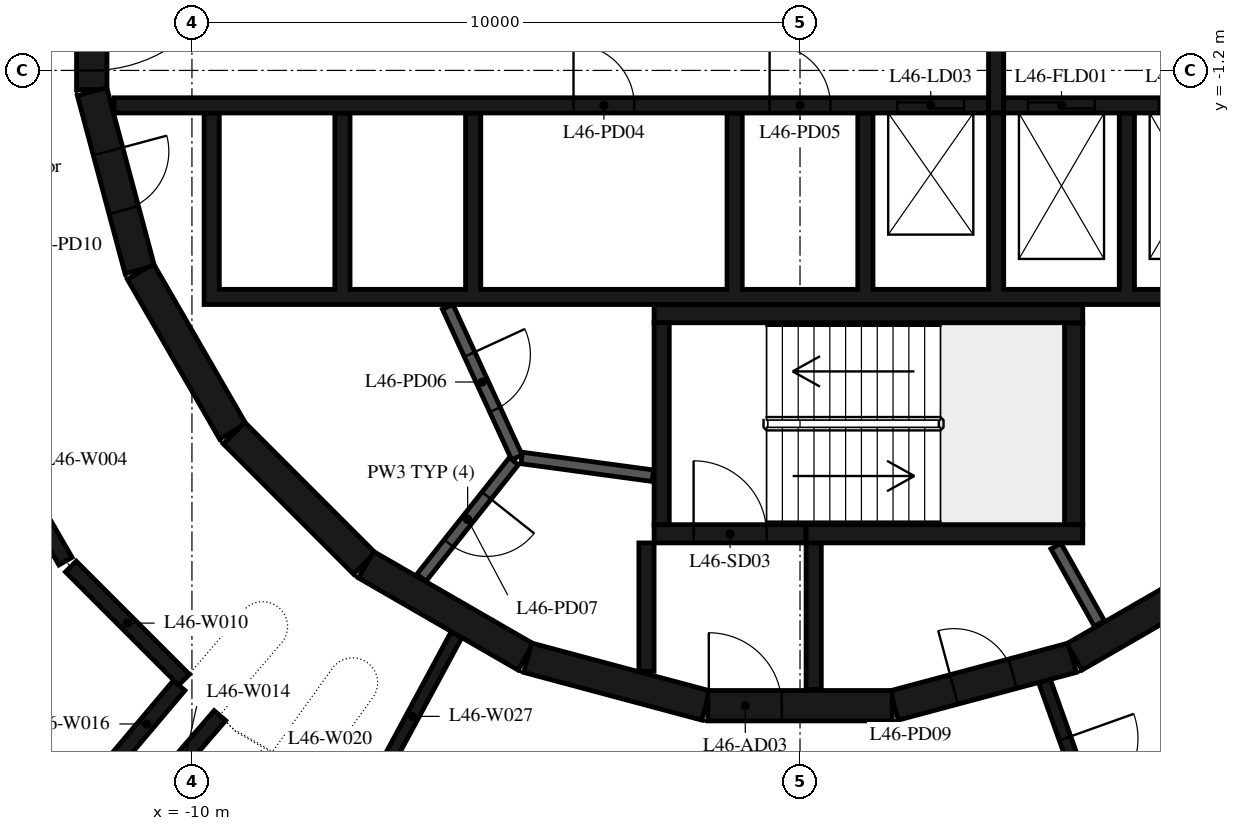
"""IFC4 building model, lengths in metres.
Left out: names, types, materials, properties, quantities, classifications, styles, units other than length and angle.
Written with IfcOpenShell. Run it as: python <this file> out.ifc"""

import sys

from ifc_helpers import new_model, si_unit, direction, frame, frame_2d, origin, place, context, subcontext, project, spatial, polyline, rectangle, outline, extrude, element, fill, save


model = new_model("IFC4")
c1 = context("Model", 3, precision=1e-05, world=origin(), true_north=direction((0.0, 1.0)))
c2 = subcontext(c1, "Body", "Model", "MODEL_VIEW")
j1 = project(units=[si_unit("LENGTHUNIT", "METRE"), si_unit("PLANEANGLEUNIT", "RADIAN")], contexts=[c1])
p1 = place(None, origin())
s1 = spatial("IfcSite", under=j1, at=p1, CompositionType="ELEMENT")
p2 = place(p1, origin())
s2 = spatial("IfcBuilding", under=s1, at=p2, CompositionType="ELEMENT")
p3 = place(p2, frame((0.0, 0.0, 183.2)))
s3 = spatial("IfcBuildingStorey", under=s2, at=p3, CompositionType="ELEMENT", Elevation=183.2)
p4 = place(p3, frame((1.55, -11.643, 0.0), z_axis=(0.0, 0.0, 1.0), x_axis=(0.965948410781, 0.258734743916, 0.0)))
e1 = element("IfcWall", 1, at=p4, inside=s3, PredefinedType="SHEAR", context=c2, shape_type="SweptSolid", body=[
    extrude(rectangle(XDim=3.033, YDim=0.5, at=frame_2d((1.516, 0.0))), origin(), (0.0, 0.0, 1.0), 4.75),
])
p5 = place(p4, frame((1.016, 0.0, 0.0)))
e2 = element("IfcOpeningElement", 2, at=p5, cuts=e1, PredefinedType="OPENING", context=c2, shape_type="SweptSolid", body=[
    extrude(rectangle(XDim=1.0, YDim=2.4, at=frame_2d((0.5, 1.2))), frame((0.0, 0.26, 0.0), z_axis=(0.0, -1.0, 0.0), x_axis=(1.0, 0.0, 0.0)), (0.0, 0.0, 1.0), 0.52),
])
p6 = place(p3, frame((4.51, -10.845, 0.0), z_axis=(0.0, 0.0, 1.0), x_axis=(0.865975092491, 0.500087131594, 0.0)))
e3 = element("IfcWall", 3, at=p6, inside=s3, PredefinedType="SHEAR", context=c2, shape_type="SweptSolid", body=[
    extrude(rectangle(XDim=3.033, YDim=0.5, at=frame_2d((1.516, 0.0))), origin(), (0.0, 0.0, 1.0), 4.75),
])
p7 = place(p3, frame((-11.647, 1.516, 0.0), z_axis=(0.0, 0.0, 1.0), x_axis=(0.0, -1.0, 0.0)))
e4 = element("IfcWall", 4, at=p7, inside=s3, PredefinedType="SHEAR", context=c2, shape_type="SweptSolid", body=[
    extrude(rectangle(XDim=3.033, YDim=0.5, at=frame_2d((1.516, 0.0))), origin(), (0.0, 0.0, 1.0), 4.75),
])
p8 = place(p7, frame((0.316, 0.0, 0.0)))
e5 = element("IfcOpeningElement", 5, at=p8, cuts=e4, PredefinedType="OPENING", context=c2, shape_type="SweptSolid", body=[
    extrude(rectangle(XDim=2.4, YDim=2.1, at=frame_2d((1.2, 1.05))), frame((0.0, 0.26, 0.0), z_axis=(0.0, -1.0, 0.0), x_axis=(1.0, 0.0, 0.0)), (0.0, 0.0, 1.0), 0.52),
])
p9 = place(p3, frame((-11.643, -1.55, 0.0), z_axis=(0.0, 0.0, 1.0), x_axis=(0.258734743916, -0.965948410781, 0.0)))
e6 = element("IfcWall", 6, at=p9, inside=s3, PredefinedType="SHEAR", context=c2, shape_type="SweptSolid", body=[
    extrude(rectangle(XDim=3.033, YDim=0.5, at=frame_2d((1.516, 0.0))), origin(), (0.0, 0.0, 1.0), 4.75),
])
p10 = place(p9, frame((1.016, 0.0, 0.0)))
e7 = element("IfcOpeningElement", 7, at=p10, cuts=e6, PredefinedType="OPENING", context=c2, shape_type="SweptSolid", body=[
    extrude(rectangle(XDim=1.0, YDim=2.4, at=frame_2d((0.5, 1.2))), frame((0.0, 0.26, 0.0), z_axis=(0.0, -1.0, 0.0), x_axis=(1.0, 0.0, 0.0)), (0.0, 0.0, 1.0), 0.52),
])
p11 = place(p3, frame((-10.845, -4.51, 0.0), z_axis=(0.0, 0.0, 1.0), x_axis=(0.500087131594, -0.865975092491, 0.0)))
e8 = element("IfcWall", 8, at=p11, inside=s3, PredefinedType="SHEAR", context=c2, shape_type="SweptSolid", body=[
    extrude(rectangle(XDim=3.033, YDim=0.5, at=frame_2d((1.516, 0.0))), origin(), (0.0, 0.0, 1.0), 4.75),
])
p12 = place(p3, frame((-9.308, -7.164, 0.0), z_axis=(0.0, 0.0, 1.0), x_axis=(0.707106781187, -0.707106781187, 0.0)))
e9 = element("IfcWall", 9, at=p12, inside=s3, PredefinedType="SHEAR", context=c2, shape_type="SweptSolid", body=[
    extrude(rectangle(XDim=3.032, YDim=0.5, at=frame_2d((1.516, 0.0))), origin(), (0.0, 0.0, 1.0), 4.75),
])
for number, where, z_axis, x_axis in (
    (10, (-7.137, -9.329, 0.0), (0.0, 0.0, 1.0), (0.866, -0.5, 0.0)),
    (11, (-4.479, -10.858, 0.0), (0.0, 0.0, 1.0), (0.966, -0.259, 0.0)),
):
    element("IfcWall", number, at=place(p3, frame(where, z_axis=z_axis, x_axis=x_axis)), inside=s3, PredefinedType="SHEAR", context=c2, shape_type="SweptSolid", body=[
        extrude(rectangle(XDim=3.033, YDim=0.5, at=frame_2d((1.516, 0.0))), origin(), (0.0, 0.0, 1.0), 4.75),
    ])
p13 = place(p3, frame((-1.516, -11.647, 0.0), z_axis=(0.0, 0.0, 1.0), x_axis=(1.0, 0.0, 0.0)))
e12 = element("IfcWall", 12, at=p13, inside=s3, PredefinedType="SHEAR", context=c2, shape_type="SweptSolid", body=[
    extrude(rectangle(XDim=3.033, YDim=0.5, at=frame_2d((1.516, 0.0))), origin(), (0.0, 0.0, 1.0), 4.75),
])
p14 = place(p13, frame((0.016, 0.0, 0.0)))
e13 = element("IfcOpeningElement", 13, at=p14, cuts=e12, PredefinedType="OPENING", context=c2, shape_type="SweptSolid", body=[
    extrude(rectangle(XDim=1.2, YDim=2.1, at=frame_2d((0.6, 1.05))), frame((0.0, 0.26, 0.0), z_axis=(0.0, -1.0, 0.0), x_axis=(1.0, 0.0, 0.0)), (0.0, 0.0, 1.0), 0.52),
])
p15 = place(p3, frame((-2.275, -8.67, 0.0), z_axis=(0.0, 0.0, 1.0), x_axis=(0.0, 1.0, 0.0)))
e14 = element("IfcWall", 14, at=p15, inside=s3, PredefinedType="SHEAR", context=c2, shape_type="SweptSolid", body=[
    extrude(rectangle(XDim=3.32, YDim=0.25, at=frame_2d((1.66, 0.0))), origin(), (0.0, 0.0, 1.0), 4.75),
])
p16 = place(p3, frame((-2.4, -5.2, 0.0), z_axis=(0.0, 0.0, 1.0), x_axis=(1.0, 0.0, 0.0)))
e15 = element("IfcWall", 15, at=p16, inside=s3, PredefinedType="SHEAR", context=c2, shape_type="SweptSolid", body=[
    extrude(rectangle(XDim=7.05, YDim=0.3, at=frame_2d((3.525, 0.0))), origin(), (0.0, 0.0, 1.0), 4.75),
])
p17 = place(p3, frame((4.5, -8.67, 0.0), z_axis=(0.0, 0.0, 1.0), x_axis=(0.0, 1.0, 0.0)))
e16 = element("IfcWall", 16, at=p17, inside=s3, PredefinedType="SHEAR", context=c2, shape_type="SweptSolid", body=[
    extrude(rectangle(XDim=3.32, YDim=0.3, at=frame_2d((1.66, 0.0))), origin(), (0.0, 0.0, 1.0), 4.75),
])
p18 = place(p3, frame((0.1, -8.82, 0.0), z_axis=(0.0, 0.0, 1.0), x_axis=(1.0, 0.0, 0.0)))
e17 = element("IfcWall", 17, at=p18, inside=s3, PredefinedType="SHEAR", context=c2, shape_type="SweptSolid", body=[
    extrude(rectangle(XDim=4.55, YDim=0.3, at=frame_2d((2.275, 0.0))), origin(), (0.0, 0.0, 1.0), 4.75),
])
p19 = place(p3, frame((-2.4, -8.82, 0.0), z_axis=(0.0, 0.0, 1.0), x_axis=(1.0, 0.0, 0.0)))
e18 = element("IfcWall", 18, at=p19, inside=s3, PredefinedType="SHEAR", context=c2, shape_type="SweptSolid", body=[
    extrude(rectangle(XDim=2.5, YDim=0.3, at=frame_2d((1.25, 0.0))), origin(), (0.0, 0.0, 1.0), 4.75),
])
p20 = place(p19, frame((0.65, 0.0, 0.0)))
e19 = element("IfcOpeningElement", 19, at=p20, cuts=e18, PredefinedType="OPENING", context=c2, shape_type="SweptSolid", body=[
    extrude(rectangle(XDim=1.2, YDim=2.1, at=frame_2d((0.6, 1.05))), frame((0.0, 0.16, 0.0), z_axis=(0.0, -1.0, 0.0), x_axis=(1.0, 0.0, 0.0)), (0.0, 0.0, 1.0), 0.32),
])
p21 = place(p3, frame((-2.525, -8.97, 0.0), z_axis=(0.0, 0.0, 1.0), x_axis=(0.0, -1.0, 0.0)))
e20 = element("IfcWall", 20, at=p21, inside=s3, PredefinedType="SHEAR", context=c2, shape_type="SweptSolid", body=[
    extrude(rectangle(XDim=2.11, YDim=0.25, at=frame_2d((1.055, 0.0))), origin(), (0.0, 0.0, 1.0), 4.75),
])
p22 = place(p3, frame((0.225, -8.97, 0.0), z_axis=(0.0, 0.0, 1.0), x_axis=(0.0, -1.0, 0.0)))
e21 = element("IfcWall", 21, at=p22, inside=s3, PredefinedType="SHEAR", context=c2, shape_type="SweptSolid", body=[
    extrude(rectangle(XDim=2.41, YDim=0.25, at=frame_2d((1.205, 0.0))), origin(), (0.0, 0.0, 1.0), 4.75),
])
p23 = place(p3, origin())
e22 = element("IfcWall", 22, at=p23, inside=s3, PredefinedType="SHEAR", context=c2, shape_type="SweptSolid", body=[
    extrude(outline(polyline([(9.8, -5.05), (9.8, -4.8), (9.8, -1.9), (9.55, -1.9), (9.55, -4.8), (7.65, -4.8), (7.65, -1.9), (7.4, -1.9), (7.4, -4.8), (5.5, -4.8), (5.5, -1.9), (5.25, -1.9), (5.25, -4.8), (3.35, -4.8), (3.35, -1.9), (3.1, -1.9), (3.1, -4.8), (1.2, -4.8), (1.2, -1.9), (0.95, -1.9), (0.95, -4.8), (-0.95, -4.8), (-0.95, -1.9), (-1.2, -1.9), (-1.2, -4.8), (-5.25, -4.8), (-5.25, -1.9), (-5.5, -1.9), (-5.5, -4.8), (-7.4, -4.8), (-7.4, -1.9), (-7.65, -1.9), (-7.65, -4.8), (-9.55, -4.8), (-9.55, -1.9), (-9.8, -1.9), (-9.8, -4.8), (-9.8, -5.05), (9.8, -5.05)])), origin(), (0.0, 0.0, 1.0), 4.75),
])
p24 = place(p3, frame((-11.28, -1.775, 0.0), z_axis=(0.0, 0.0, 1.0), x_axis=(1.0, 0.0, 0.0)))
e23 = element("IfcWall", 23, at=p24, inside=s3, PredefinedType="SHEAR", context=c2, shape_type="SweptSolid", body=[
    extrude(rectangle(XDim=14.38, YDim=0.25, at=frame_2d((7.19, 0.0))), origin(), (0.0, 0.0, 1.0), 4.75),
])
p25 = place(p24, frame((12.88, 0.0, 0.0)))
e24 = element("IfcOpeningElement", 24, at=p25, cuts=e23, PredefinedType="OPENING", context=c2, shape_type="SweptSolid", body=[
    extrude(rectangle(XDim=1.1, YDim=2.1, at=frame_2d((0.55, 1.05))), frame((0.0, 0.135, 0.0), z_axis=(0.0, -1.0, 0.0), x_axis=(1.0, 0.0, 0.0)), (0.0, 0.0, 1.0), 0.27),
])
p26 = place(p24, frame((7.555, 0.0, 0.0)))
e25 = element("IfcOpeningElement", 25, at=p26, cuts=e23, PredefinedType="OPENING", context=c2, shape_type="SweptSolid", body=[
    extrude(rectangle(XDim=1.0, YDim=2.4, at=frame_2d((0.5, 1.2))), frame((0.0, 0.135, 0.0), z_axis=(0.0, -1.0, 0.0), x_axis=(1.0, 0.0, 0.0)), (0.0, 0.0, 1.0), 0.27),
])
p27 = place(p24, frame((10.78, 0.0, 0.0)))
e26 = element("IfcOpeningElement", 26, at=p27, cuts=e23, PredefinedType="OPENING", context=c2, shape_type="SweptSolid", body=[
    extrude(rectangle(XDim=1.0, YDim=2.4, at=frame_2d((0.5, 1.2))), frame((0.0, 0.135, 0.0), z_axis=(0.0, -1.0, 0.0), x_axis=(1.0, 0.0, 0.0)), (0.0, 0.0, 1.0), 0.27),
])
p28 = place(p3, frame((3.35, -1.775, 0.0), z_axis=(0.0, 0.0, 1.0), x_axis=(1.0, 0.0, 0.0)))
e27 = element("IfcWall", 27, at=p28, inside=s3, PredefinedType="SHEAR", context=c2, shape_type="SweptSolid", body=[
    extrude(rectangle(XDim=7.93, YDim=0.25, at=frame_2d((3.965, 0.0))), origin(), (0.0, 0.0, 1.0), 4.75),
])
p29 = place(p28, frame((0.4, 0.0, 0.0)))
e28 = element("IfcOpeningElement", 28, at=p29, cuts=e27, PredefinedType="OPENING", context=c2, shape_type="SweptSolid", body=[
    extrude(rectangle(XDim=1.1, YDim=2.4, at=frame_2d((0.55, 1.2))), frame((0.0, 0.135, 0.0), z_axis=(0.0, -1.0, 0.0), x_axis=(1.0, 0.0, 0.0)), (0.0, 0.0, 1.0), 0.27),
])
p30 = place(p28, frame((2.55, 0.0, 0.0)))
e29 = element("IfcOpeningElement", 29, at=p30, cuts=e27, PredefinedType="OPENING", context=c2, shape_type="SweptSolid", body=[
    extrude(rectangle(XDim=1.1, YDim=2.4, at=frame_2d((0.55, 1.2))), frame((0.0, 0.135, 0.0), z_axis=(0.0, -1.0, 0.0), x_axis=(1.0, 0.0, 0.0)), (0.0, 0.0, 1.0), 0.27),
])
p31 = place(p28, frame((4.7, 0.0, 0.0)))
e30 = element("IfcOpeningElement", 30, at=p31, cuts=e27, PredefinedType="OPENING", context=c2, shape_type="SweptSolid", body=[
    extrude(rectangle(XDim=1.1, YDim=2.4, at=frame_2d((0.55, 1.2))), frame((0.0, 0.135, 0.0), z_axis=(0.0, -1.0, 0.0), x_axis=(1.0, 0.0, 0.0)), (0.0, 0.0, 1.0), 0.27),
])
p32 = place(p3, frame((3.225, -1.9, 0.0), z_axis=(0.0, 0.0, 1.0), x_axis=(0.0, 1.0, 0.0)))
e31 = element("IfcWall", 31, at=p32, inside=s3, PredefinedType="SHEAR", context=c2, shape_type="SweptSolid", body=[
    extrude(rectangle(XDim=3.8, YDim=0.25, at=frame_2d((1.9, 0.0))), origin(), (0.0, 0.0, 1.0), 4.75),
])
p33 = place(p3, frame((4.922, -10.296, 0.0), z_axis=(0.0, 0.0, 1.0), x_axis=(-0.48860846254, 0.872503163509, 0.0)))
e32 = element("IfcWall", 32, at=p33, inside=s3, PredefinedType="PARTITIONING", context=c2, shape_type="SweptSolid", body=[
    extrude(rectangle(XDim=1.459, YDim=0.19, at=frame_2d((0.73, 0.0))), origin(), (0.0, 0.0, 1.0), 4.75),
])
p34 = place(p3, frame((-5.795, -5.086, 0.0), z_axis=(0.0, 0.0, 1.0), x_axis=(0.417887867606, -0.908498613157, 0.0)))
e33 = element("IfcWall", 33, at=p34, inside=s3, PredefinedType="PARTITIONING", context=c2, shape_type="SweptSolid", body=[
    extrude(rectangle(XDim=2.726, YDim=0.19, at=frame_2d((1.363, 0.0))), origin(), (0.0, 0.0, 1.0), 4.75),
])
p35 = place(p34, frame((0.863, 0.0, 0.0)))
e34 = element("IfcOpeningElement", 34, at=p35, cuts=e33, PredefinedType="OPENING", context=c2, shape_type="SweptSolid", body=[
    extrude(rectangle(XDim=1.0, YDim=2.4, at=frame_2d((0.5, 1.2))), frame((0.0, 0.105, 0.0), z_axis=(0.0, -1.0, 0.0), x_axis=(1.0, 0.0, 0.0)), (0.0, 0.0, 1.0), 0.21),
])
p36 = place(p3, frame((-4.706, -7.625, 0.0), z_axis=(0.0, 0.0, 1.0), x_axis=(-0.621392599334, -0.783499353856, 0.0)))
e35 = element("IfcWall", 35, at=p36, inside=s3, PredefinedType="PARTITIONING", context=c2, shape_type="SweptSolid", body=[
    extrude(rectangle(XDim=2.447, YDim=0.19, at=frame_2d((1.224, 0.0))), origin(), (0.0, 0.0, 1.0), 4.75),
])
p37 = place(p36, frame((0.724, 0.0, 0.0)))
e36 = element("IfcOpeningElement", 36, at=p37, cuts=e35, PredefinedType="OPENING", context=c2, shape_type="SweptSolid", body=[
    extrude(rectangle(XDim=1.0, YDim=2.4, at=frame_2d((0.5, 1.2))), frame((0.0, 0.105, 0.0), z_axis=(0.0, -1.0, 0.0), x_axis=(1.0, 0.0, 0.0)), (0.0, 0.0, 1.0), 0.21),
])
p38 = place(p3, frame((-2.42, -7.865, 0.0), z_axis=(0.0, 0.0, 1.0), x_axis=(-0.990972299108, 0.134066783362, 0.0)))
e37 = element("IfcWall", 37, at=p38, inside=s3, PredefinedType="PARTITIONING", context=c2, shape_type="SweptSolid", body=[
    extrude(rectangle(XDim=2.176, YDim=0.19, at=frame_2d((1.088, 0.0))), origin(), (0.0, 0.0, 1.0), 4.75),
])
p39 = place(p3, frame((-14.007, -5.938, 0.0), z_axis=(0.0, 0.0, 1.0), x_axis=(0.500708693508, -0.865615852585, 0.0)))
e38 = element("IfcWall", 38, at=p39, inside=s3, PredefinedType="PARTITIONING", context=c2, shape_type="SweptSolid", body=[
    extrude(rectangle(XDim=3.849, YDim=0.25, at=frame_2d((1.925, 0.0))), origin(), (0.0, 0.0, 1.0), 4.75),
])
p40 = place(p3, frame((-11.992, -9.358, 0.0), z_axis=(0.0, 0.0, 1.0), x_axis=(0.707153144284, -0.707060415049, 0.0)))
e39 = element("IfcWall", 39, at=p40, inside=s3, PredefinedType="PARTITIONING", context=c2, shape_type="SweptSolid", body=[
    extrude(rectangle(XDim=2.633, YDim=0.25, at=frame_2d((1.316, 0.0))), origin(), (0.0, 0.0, 1.0), 4.75),
])
p41 = place(p3, frame((-10.66, -13.11, 0.0), z_axis=(0.0, 0.0, 1.0), x_axis=(0.652652485568, 0.757657398223, 0.0)))
e40 = element("IfcWall", 40, at=p41, inside=s3, PredefinedType="PARTITIONING", context=c2, shape_type="SweptSolid", body=[
    extrude(rectangle(XDim=1.716, YDim=0.25, at=frame_2d((0.858, 0.0))), origin(), (0.0, 0.0, 1.0), 4.75),
])
p42 = place(p3, frame((-10.211, -11.315, 0.0), z_axis=(0.0, 0.0, 1.0), x_axis=(-0.645677872328, -0.763609903803, 0.0)))
e41 = element("IfcWall", 41, at=p42, inside=s3, PredefinedType="PARTITIONING", context=c2, shape_type="SweptSolid", body=[
    extrude(rectangle(XDim=1.656, YDim=0.25, at=frame_2d((0.828, 0.0))), origin(), (0.0, 0.0, 1.0), 4.75),
])
p43 = place(p3, frame((-7.097, -13.165, 0.0), z_axis=(0.0, 0.0, 1.0), x_axis=(0.474500660471, 0.880255146655, 0.0)))
e42 = element("IfcWall", 42, at=p43, inside=s3, PredefinedType="PARTITIONING", context=c2, shape_type="SweptSolid", body=[
    extrude(rectangle(XDim=3.051, YDim=0.2, at=frame_2d((1.525, 0.0))), origin(), (0.0, 0.0, 1.0), 4.75),
])
p44 = place(p3, frame((4.02, -11.24, 0.0), z_axis=(0.0, 0.0, 1.0), x_axis=(0.336751058688, -0.941593715183, 0.0)))
e43 = element("IfcWall", 43, at=p44, inside=s3, PredefinedType="PARTITIONING", context=c2, shape_type="SweptSolid", body=[
    extrude(rectangle(XDim=3.207, YDim=0.2, at=frame_2d((1.604, 0.0))), origin(), (0.0, 0.0, 1.0), 4.75),
])
p45 = place(p44, frame((1.004, 0.0, 0.0)))
e44 = element("IfcOpeningElement", 44, at=p45, cuts=e43, PredefinedType="OPENING", context=c2, shape_type="SweptSolid", body=[
    extrude(rectangle(XDim=1.2, YDim=2.1, at=frame_2d((0.6, 1.05))), frame((0.0, 0.11, 0.0), z_axis=(0.0, -1.0, 0.0), x_axis=(1.0, 0.0, 0.0)), (0.0, 0.0, 1.0), 0.22),
])
p46 = place(p3, frame((5.938, -14.007, 0.0), z_axis=(0.0, 0.0, 1.0), x_axis=(0.865615852585, 0.500708693508, 0.0)))
e45 = element("IfcWall", 45, at=p46, inside=s3, PredefinedType="PARTITIONING", context=c2, shape_type="SweptSolid", body=[
    extrude(rectangle(XDim=3.849, YDim=0.25, at=frame_2d((1.925, 0.0))), origin(), (0.0, 0.0, 1.0), 4.75),
])
p47 = place(p46, frame((1.425, 0.0, 0.0)))
e46 = element("IfcOpeningElement", 46, at=p47, cuts=e45, PredefinedType="OPENING", context=c2, shape_type="SweptSolid", body=[
    extrude(rectangle(XDim=1.0, YDim=2.1, at=frame_2d((0.5, 1.05))), frame((0.0, 0.135, 0.0), z_axis=(0.0, -1.0, 0.0), x_axis=(1.0, 0.0, 0.0)), (0.0, 0.0, 1.0), 0.27),
])
p48 = place(p20, origin())
e47 = element("IfcDoor", 47, at=p48, inside=s3, OperationType="SINGLE_SWING_LEFT", PredefinedType="DOOR", context=c2, shape_type="SweptSolid", body=[
    extrude(rectangle(XDim=1.2, YDim=2.1, at=frame_2d((0.6, 1.05))), frame((0.0, 0.025, 0.0), z_axis=(0.0, -1.0, 0.0), x_axis=(1.0, 0.0, 0.0)), (0.0, 0.0, 1.0), 0.05),
])
fill(e19, e47)
p49 = place(p14, origin())
e48 = element("IfcDoor", 48, at=p49, inside=s3, OperationType="SINGLE_SWING_RIGHT", PredefinedType="DOOR", context=c2, shape_type="SweptSolid", body=[
    extrude(rectangle(XDim=1.2, YDim=2.1, at=frame_2d((0.6, 1.05))), frame((0.0, 0.025, 0.0), z_axis=(0.0, -1.0, 0.0), x_axis=(1.0, 0.0, 0.0)), (0.0, 0.0, 1.0), 0.05),
])
fill(e13, e48)
p50 = place(p8, origin())
e49 = element("IfcDoor", 49, at=p50, inside=s3, OperationType="DOUBLE_DOOR_SINGLE_SWING", PredefinedType="DOOR", context=c2, shape_type="SweptSolid", body=[
    extrude(rectangle(XDim=2.4, YDim=2.1, at=frame_2d((1.2, 1.05))), frame((0.0, 0.025, 0.0), z_axis=(0.0, -1.0, 0.0), x_axis=(1.0, 0.0, 0.0)), (0.0, 0.0, 1.0), 0.05),
])
fill(e5, e49)
p51 = place(p25, origin())
e50 = element("IfcDoor", 50, at=p51, inside=s3, OperationType="DOUBLE_DOOR_SLIDING", PredefinedType="DOOR", context=c2, shape_type="SweptSolid", body=[
    extrude(rectangle(XDim=1.1, YDim=2.1, at=frame_2d((0.55, 1.05))), frame((0.0, 0.025, 0.0), z_axis=(0.0, -1.0, 0.0), x_axis=(1.0, 0.0, 0.0)), (0.0, 0.0, 1.0), 0.05),
])
fill(e24, e50)
p52 = place(p29, origin())
e51 = element("IfcDoor", 51, at=p52, inside=s3, OperationType="DOUBLE_DOOR_SLIDING", PredefinedType="DOOR", context=c2, shape_type="SweptSolid", body=[
    extrude(rectangle(XDim=1.1, YDim=2.4, at=frame_2d((0.55, 1.2))), frame((0.0, 0.025, 0.0), z_axis=(0.0, -1.0, 0.0), x_axis=(1.0, 0.0, 0.0)), (0.0, 0.0, 1.0), 0.05),
])
fill(e28, e51)
p53 = place(p30, origin())
e52 = element("IfcDoor", 52, at=p53, inside=s3, OperationType="DOUBLE_DOOR_SLIDING", PredefinedType="DOOR", context=c2, shape_type="SweptSolid", body=[
    extrude(rectangle(XDim=1.1, YDim=2.4, at=frame_2d((0.55, 1.2))), frame((0.0, 0.025, 0.0), z_axis=(0.0, -1.0, 0.0), x_axis=(1.0, 0.0, 0.0)), (0.0, 0.0, 1.0), 0.05),
])
fill(e29, e52)
p54 = place(p26, origin())
e53 = element("IfcDoor", 53, at=p54, inside=s3, OperationType="SINGLE_SWING_RIGHT", PredefinedType="DOOR", context=c2, shape_type="SweptSolid", body=[
    extrude(rectangle(XDim=1.0, YDim=2.4, at=frame_2d((0.5, 1.2))), frame((0.0, 0.025, 0.0), z_axis=(0.0, -1.0, 0.0), x_axis=(1.0, 0.0, 0.0)), (0.0, 0.0, 1.0), 0.05),
])
fill(e25, e53)
p55 = place(p27, origin())
e54 = element("IfcDoor", 54, at=p55, inside=s3, OperationType="SINGLE_SWING_LEFT", PredefinedType="DOOR", context=c2, shape_type="SweptSolid", body=[
    extrude(rectangle(XDim=1.0, YDim=2.4, at=frame_2d((0.5, 1.2))), frame((0.0, 0.025, 0.0), z_axis=(0.0, -1.0, 0.0), x_axis=(1.0, 0.0, 0.0)), (0.0, 0.0, 1.0), 0.05),
])
fill(e26, e54)
p56 = place(p35, origin())
e55 = element("IfcDoor", 55, at=p56, inside=s3, OperationType="SINGLE_SWING_RIGHT", PredefinedType="DOOR", context=c2, shape_type="SweptSolid", body=[
    extrude(rectangle(XDim=1.0, YDim=2.4, at=frame_2d((0.5, 1.2))), frame((0.0, 0.025, 0.0), z_axis=(0.0, -1.0, 0.0), x_axis=(1.0, 0.0, 0.0)), (0.0, 0.0, 1.0), 0.05),
])
fill(e34, e55)
p57 = place(p37, origin())
e56 = element("IfcDoor", 56, at=p57, inside=s3, OperationType="SINGLE_SWING_LEFT", PredefinedType="DOOR", context=c2, shape_type="SweptSolid", body=[
    extrude(rectangle(XDim=1.0, YDim=2.4, at=frame_2d((0.5, 1.2))), frame((0.0, 0.025, 0.0), z_axis=(0.0, -1.0, 0.0), x_axis=(1.0, 0.0, 0.0)), (0.0, 0.0, 1.0), 0.05),
])
fill(e36, e56)
p58 = place(p5, origin())
e57 = element("IfcDoor", 57, at=p58, inside=s3, OperationType="SINGLE_SWING_LEFT", PredefinedType="DOOR", context=c2, shape_type="SweptSolid", body=[
    extrude(rectangle(XDim=1.0, YDim=2.4, at=frame_2d((0.5, 1.2))), frame((0.0, 0.025, 0.0), z_axis=(0.0, -1.0, 0.0), x_axis=(1.0, 0.0, 0.0)), (0.0, 0.0, 1.0), 0.05),
])
fill(e2, e57)
p59 = place(p10, origin())
e58 = element("IfcDoor", 58, at=p59, inside=s3, OperationType="SINGLE_SWING_RIGHT", PredefinedType="DOOR", context=c2, shape_type="SweptSolid", body=[
    extrude(rectangle(XDim=1.0, YDim=2.4, at=frame_2d((0.5, 1.2))), frame((0.0, 0.025, 0.0), z_axis=(0.0, -1.0, 0.0), x_axis=(1.0, 0.0, 0.0)), (0.0, 0.0, 1.0), 0.05),
])
fill(e7, e58)
p60 = place(p45, origin())
e59 = element("IfcDoor", 59, at=p60, inside=s3, OperationType="SINGLE_SWING_LEFT", PredefinedType="DOOR", context=c2, shape_type="SweptSolid", body=[
    extrude(rectangle(XDim=1.2, YDim=2.1, at=frame_2d((0.6, 1.05))), frame((0.0, 0.025, 0.0), z_axis=(0.0, -1.0, 0.0), x_axis=(1.0, 0.0, 0.0)), (0.0, 0.0, 1.0), 0.05),
])
fill(e44, e59)
save(model, sys.argv[1])
